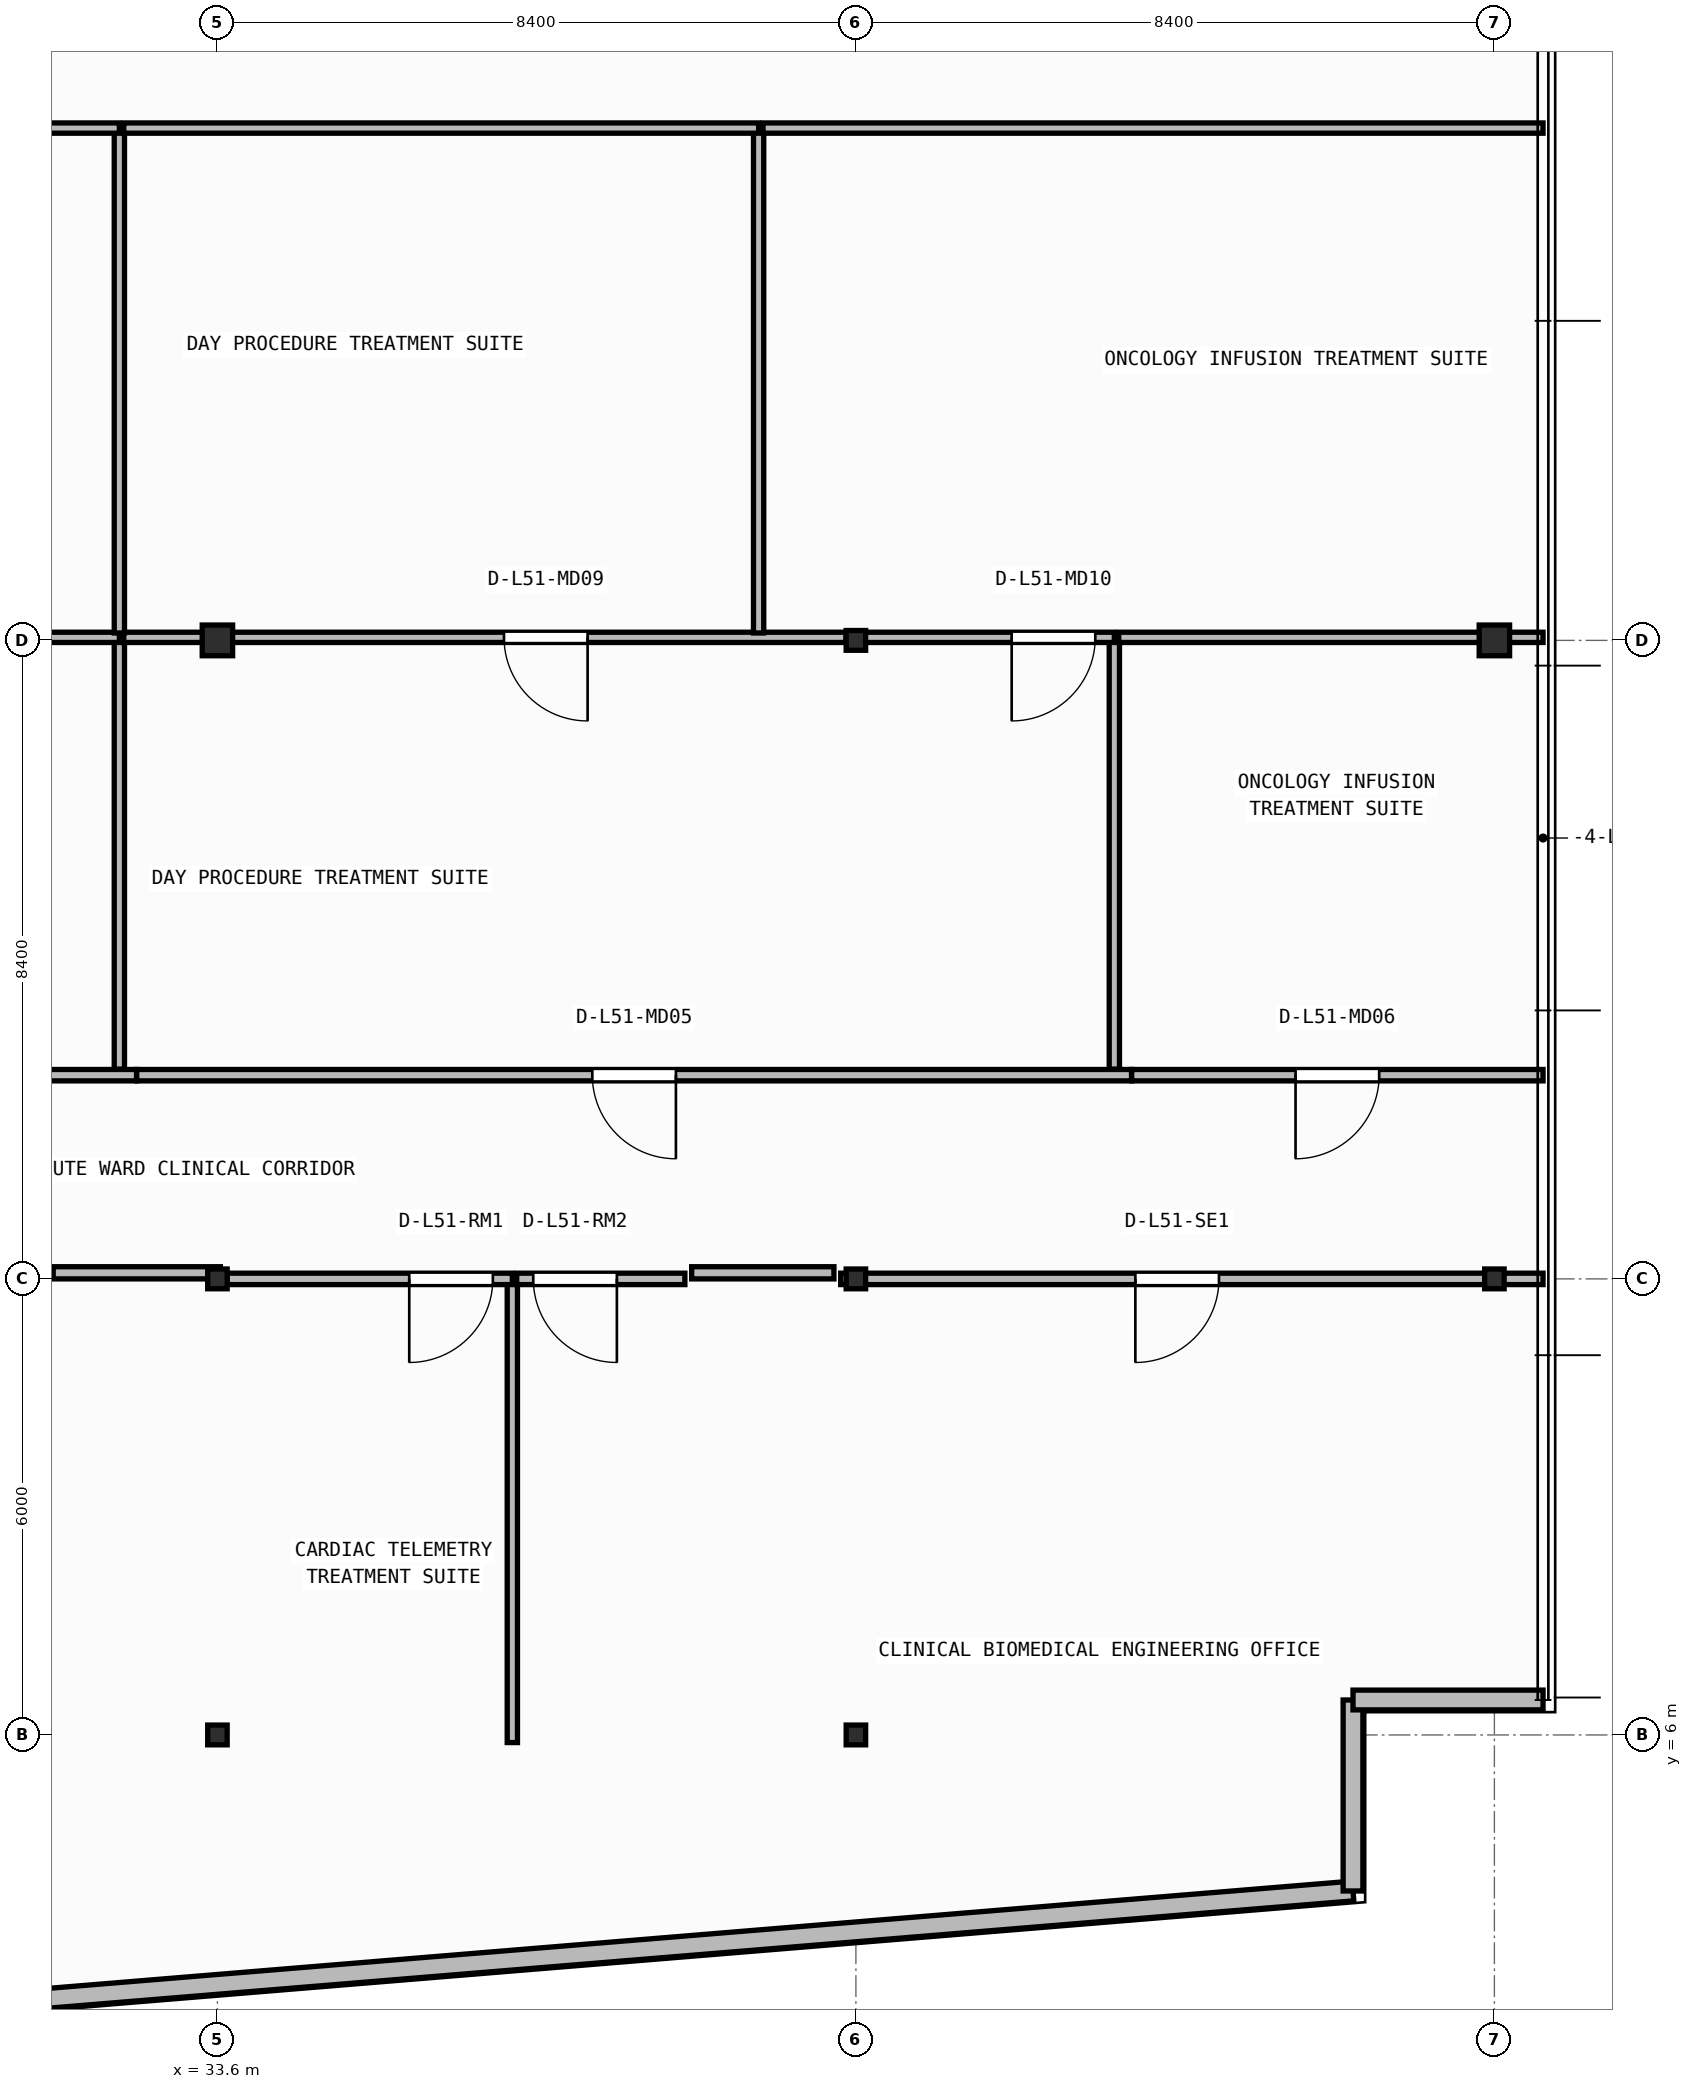
"""IFC4 building model, lengths in metres.
Left out: names, types, materials, properties, quantities, classifications, styles, units other than length and angle.
Written with IfcOpenShell. Run it as: python <this file> out.ifc"""

import sys

from ifc_helpers import new_model, si_unit, direction, frame, frame_2d, origin, origin_2d, place, context, subcontext, project, spatial, rectangle, i_section, extrude, element, fill, save


model = new_model("IFC4")
c1 = context("Model", 3, precision=1e-05, world=origin(), true_north=direction((0.0, 1.0)))
c2 = subcontext(c1, "Body", "Model", "MODEL_VIEW")
j1 = project(units=[si_unit("LENGTHUNIT", "METRE"), si_unit("PLANEANGLEUNIT", "RADIAN")], contexts=[c1])
p1 = place(None, origin())
s1 = spatial("IfcSite", under=j1, at=p1, CompositionType="ELEMENT")
p2 = place(p1, origin())
s2 = spatial("IfcBuilding", under=s1, at=p2, CompositionType="ELEMENT")
p3 = place(p2, frame((0.0, 0.0, 207.9)))
s3 = spatial("IfcBuildingStorey", under=s2, at=p3, CompositionType="ELEMENT", Elevation=207.9)
for number, where, z_axis, x_axis in (
    (1, (33.6, 6.0, 0.0), (0.0, 0.0, 1.0), (1.0, 0.0, 0.0)),
    (2, (42.0, 6.0, 0.0), (0.0, 0.0, 1.0), (1.0, 0.0, 0.0)),
    (3, (33.6, 12.0, 0.0), (0.0, 0.0, 1.0), (1.0, 0.0, 0.0)),
    (4, (42.0, 12.0, 0.0), (0.0, 0.0, 1.0), (1.0, 0.0, 0.0)),
    (5, (50.4, 12.0, 0.0), (0.0, 0.0, 1.0), (1.0, 0.0, 0.0)),
):
    element("IfcColumn", number, at=place(p3, frame(where, z_axis=z_axis, x_axis=x_axis)), inside=s3, PredefinedType="COLUMN", context=c2, shape_type="SweptSolid", body=[
        extrude(i_section(OverallWidth=0.256, OverallDepth=0.26, WebThickness=0.01, FlangeThickness=0.017, FilletRadius=0.013, at=origin_2d()), origin(), (0.0, 0.0, 1.0), 3.95),
    ])
p4 = place(p3, frame((33.6, 20.4, 0.0), z_axis=(0.0, 0.0, 1.0), x_axis=(1.0, 0.0, 0.0)))
e6 = element("IfcColumn", 6, at=p4, inside=s3, PredefinedType="COLUMN", context=c2, shape_type="SweptSolid", body=[
    extrude(i_section(OverallWidth=0.4, OverallDepth=0.404, WebThickness=0.02, FlangeThickness=0.032, at=origin_2d()), origin(), (0.0, 0.0, 1.0), 3.95),
])
p5 = place(p3, frame((42.0, 20.4, 0.0), z_axis=(0.0, 0.0, 1.0), x_axis=(1.0, 0.0, 0.0)))
e7 = element("IfcColumn", 7, at=p5, inside=s3, PredefinedType="COLUMN", context=c2, shape_type="SweptSolid", body=[
    extrude(i_section(OverallWidth=0.256, OverallDepth=0.26, WebThickness=0.01, FlangeThickness=0.017, FilletRadius=0.013, at=origin_2d()), origin(), (0.0, 0.0, 1.0), 3.95),
])
p6 = place(p3, frame((50.4, 20.4, 0.0), z_axis=(0.0, 0.0, 1.0), x_axis=(1.0, 0.0, 0.0)))
e8 = element("IfcColumn", 8, at=p6, inside=s3, PredefinedType="COLUMN", context=c2, shape_type="SweptSolid", body=[
    extrude(i_section(OverallWidth=0.4, OverallDepth=0.404, WebThickness=0.02, FlangeThickness=0.032, at=origin_2d()), origin(), (0.0, 0.0, 1.0), 3.95),
])
p7 = place(p3, frame((2.66, 0.174, 0.0), z_axis=(0.0, 0.0, 1.0), x_axis=(0.996634028439, 0.081979347142, 0.0)))
e9 = element("IfcWall", 9, at=p7, inside=s3, PredefinedType="STANDARD", context=c2, shape_type="SweptSolid", body=[
    extrude(rectangle(XDim=46.035, YDim=0.26, at=frame_2d((23.018, 0.0))), origin(), (0.0, 0.0, 1.0), 3.71),
])
p8 = place(p7, frame((21.817, 0.0, 0.9)))
e10 = element("IfcOpeningElement", 10, at=p8, cuts=e9, PredefinedType="OPENING", context=c2, shape_type="SweptSolid", body=[
    extrude(rectangle(XDim=2.4, YDim=1.65, at=frame_2d((1.2, 0.825))), frame((0.0, 0.14, 0.0), z_axis=(0.0, -1.0, 0.0), x_axis=(1.0, 0.0, 0.0)), (0.0, 0.0, 1.0), 0.28),
])
p9 = place(p3, frame((48.54, 3.948, 0.0), z_axis=(0.0, 0.0, 1.0), x_axis=(0.0, 1.0, 0.0)))
e11 = element("IfcWall", 11, at=p9, inside=s3, PredefinedType="STANDARD", context=c2, shape_type="SweptSolid", body=[
    extrude(rectangle(XDim=2.512, YDim=0.26, at=frame_2d((1.256, 0.0))), origin(), (0.0, 0.0, 1.0), 3.71),
])
p10 = place(p3, frame((48.54, 6.46, 0.0), z_axis=(0.0, 0.0, 1.0), x_axis=(1.0, 0.0, 0.0)))
e12 = element("IfcWall", 12, at=p10, inside=s3, PredefinedType="STANDARD", context=c2, shape_type="SweptSolid", body=[
    extrude(rectangle(XDim=2.5, YDim=0.26, at=frame_2d((1.25, 0.0))), origin(), (0.0, 0.0, 1.0), 3.71),
])
p11 = place(p3, frame((37.48, 5.9, 0.0), z_axis=(0.0, 0.0, 1.0), x_axis=(0.0, 1.0, 0.0)))
e13 = element("IfcWall", 13, at=p11, inside=s3, PredefinedType="PARTITIONING", context=c2, shape_type="SweptSolid", body=[
    extrude(rectangle(XDim=6.1, YDim=0.135, at=frame_2d((3.05, 0.0))), origin(), (0.0, 0.0, 1.0), 3.71),
])
p12 = place(p3, frame((37.48, 12.0, 0.0), z_axis=(0.0, 0.0, 1.0), x_axis=(-1.0, 0.0, 0.0)))
e14 = element("IfcWall", 14, at=p12, inside=s3, PredefinedType="PARTITIONING", context=c2, shape_type="SweptSolid", body=[
    extrude(rectangle(XDim=3.752, YDim=0.15, at=frame_2d((1.876, 0.0))), origin(), (0.0, 0.0, 1.0), 3.152),
])
p13 = place(p12, frame((0.256, 0.0, 0.0)))
e15 = element("IfcOpeningElement", 15, at=p13, cuts=e14, PredefinedType="OPENING", context=c2, shape_type="SweptSolid", body=[
    extrude(rectangle(XDim=1.1, YDim=2.1, at=frame_2d((0.55, 1.05))), frame((0.0, 0.085, 0.0), z_axis=(0.0, -1.0, 0.0), x_axis=(1.0, 0.0, 0.0)), (0.0, 0.0, 1.0), 0.17),
])
p14 = place(p3, frame((39.75, 12.0, 0.0), z_axis=(0.0, 0.0, 1.0), x_axis=(-1.0, 0.0, 0.0)))
e16 = element("IfcWall", 16, at=p14, inside=s3, PredefinedType="PARTITIONING", context=c2, shape_type="SweptSolid", body=[
    extrude(rectangle(XDim=2.212, YDim=0.15, at=frame_2d((1.106, 0.0))), origin(), (0.0, 0.0, 1.0), 3.152),
])
p15 = place(p14, frame((0.895, 0.0, 0.0)))
e17 = element("IfcOpeningElement", 17, at=p15, cuts=e16, PredefinedType="OPENING", context=c2, shape_type="SweptSolid", body=[
    extrude(rectangle(XDim=1.1, YDim=2.1, at=frame_2d((0.55, 1.05))), frame((0.0, 0.085, 0.0), z_axis=(0.0, -1.0, 0.0), x_axis=(1.0, 0.0, 0.0)), (0.0, 0.0, 1.0), 0.17),
])
p16 = place(p3, frame((51.04, 12.0, 0.0), z_axis=(0.0, 0.0, 1.0), x_axis=(-1.0, 0.0, 0.0)))
e18 = element("IfcWall", 18, at=p16, inside=s3, PredefinedType="PARTITIONING", context=c2, shape_type="SweptSolid", body=[
    extrude(rectangle(XDim=9.24, YDim=0.15, at=frame_2d((4.62, 0.0))), origin(), (0.0, 0.0, 1.0), 3.152),
])
p17 = place(p16, frame((4.263, 0.0, 0.0)))
e19 = element("IfcOpeningElement", 19, at=p17, cuts=e18, PredefinedType="OPENING", context=c2, shape_type="SweptSolid", body=[
    extrude(rectangle(XDim=1.1, YDim=2.1, at=frame_2d((0.55, 1.05))), frame((0.0, 0.085, 0.0), z_axis=(0.0, -1.0, 0.0), x_axis=(1.0, 0.0, 0.0)), (0.0, 0.0, 1.0), 0.17),
])
p18 = place(p3, frame((32.536, 14.68, 0.0), z_axis=(0.0, 0.0, 1.0), x_axis=(-1.0, 0.0, 0.0)))
e20 = element("IfcWall", 20, at=p18, inside=s3, PredefinedType="PARTITIONING", context=c2, shape_type="SweptSolid", body=[
    extrude(rectangle(XDim=10.178, YDim=0.15, at=frame_2d((5.089, 0.0))), origin(), (0.0, 0.0, 1.0), 3.71),
])
p19 = place(p18, frame((4.539, 0.0, 0.0)))
e21 = element("IfcOpeningElement", 21, at=p19, cuts=e20, PredefinedType="OPENING", context=c2, shape_type="SweptSolid", body=[
    extrude(rectangle(XDim=1.1, YDim=2.1, at=frame_2d((0.55, 1.05))), frame((0.0, 0.085, 0.0), z_axis=(0.0, -1.0, 0.0), x_axis=(1.0, 0.0, 0.0)), (0.0, 0.0, 1.0), 0.17),
])
p20 = place(p3, frame((45.626, 14.68, 0.0), z_axis=(0.0, 0.0, 1.0), x_axis=(-1.0, 0.0, 0.0)))
e22 = element("IfcWall", 22, at=p20, inside=s3, PredefinedType="PARTITIONING", context=c2, shape_type="SweptSolid", body=[
    extrude(rectangle(XDim=13.088, YDim=0.15, at=frame_2d((6.544, 0.0))), origin(), (0.0, 0.0, 1.0), 3.71),
])
p21 = place(p20, frame((5.994, 0.0, 0.0)))
e23 = element("IfcOpeningElement", 23, at=p21, cuts=e22, PredefinedType="OPENING", context=c2, shape_type="SweptSolid", body=[
    extrude(rectangle(XDim=1.1, YDim=2.1, at=frame_2d((0.55, 1.05))), frame((0.0, 0.085, 0.0), z_axis=(0.0, -1.0, 0.0), x_axis=(1.0, 0.0, 0.0)), (0.0, 0.0, 1.0), 0.17),
])
p22 = place(p3, frame((51.04, 14.68, 0.0), z_axis=(0.0, 0.0, 1.0), x_axis=(-1.0, 0.0, 0.0)))
e24 = element("IfcWall", 24, at=p22, inside=s3, PredefinedType="PARTITIONING", context=c2, shape_type="SweptSolid", body=[
    extrude(rectangle(XDim=5.412, YDim=0.15, at=frame_2d((2.706, 0.0))), origin(), (0.0, 0.0, 1.0), 3.71),
])
p23 = place(p22, frame((2.156, 0.0, 0.0)))
e25 = element("IfcOpeningElement", 25, at=p23, cuts=e24, PredefinedType="OPENING", context=c2, shape_type="SweptSolid", body=[
    extrude(rectangle(XDim=1.1, YDim=2.1, at=frame_2d((0.55, 1.05))), frame((0.0, 0.085, 0.0), z_axis=(0.0, -1.0, 0.0), x_axis=(1.0, 0.0, 0.0)), (0.0, 0.0, 1.0), 0.17),
])
p24 = place(p3, frame((32.31, 14.76, 0.0), z_axis=(0.0, 0.0, 1.0), x_axis=(0.0, 1.0, 0.0)))
e26 = element("IfcWall", 26, at=p24, inside=s3, PredefinedType="PARTITIONING", context=c2, shape_type="SweptSolid", body=[
    extrude(rectangle(XDim=5.68, YDim=0.135, at=frame_2d((2.84, 0.0))), origin(), (0.0, 0.0, 1.0), 3.71),
])
p25 = place(p3, frame((32.31, 20.44, 0.0), z_axis=(0.0, 0.0, 1.0), x_axis=(-1.0, 0.0, 0.0)))
e27 = element("IfcWall", 27, at=p25, inside=s3, PredefinedType="PARTITIONING", context=c2, shape_type="SweptSolid", body=[
    extrude(rectangle(XDim=5.291, YDim=0.135, at=frame_2d((2.645, 0.0))), origin(), (0.0, 0.0, 1.0), 3.152),
])
p26 = place(p25, frame((2.379, 0.0, 0.0)))
e28 = element("IfcOpeningElement", 28, at=p26, cuts=e27, PredefinedType="OPENING", context=c2, shape_type="SweptSolid", body=[
    extrude(rectangle(XDim=1.1, YDim=2.1, at=frame_2d((0.55, 1.05))), frame((0.0, 0.077, 0.0), z_axis=(0.0, -1.0, 0.0), x_axis=(1.0, 0.0, 0.0)), (0.0, 0.0, 1.0), 0.155),
])
p27 = place(p3, frame((45.4, 14.76, 0.0), z_axis=(0.0, 0.0, 1.0), x_axis=(0.0, 1.0, 0.0)))
e29 = element("IfcWall", 29, at=p27, inside=s3, PredefinedType="PARTITIONING", context=c2, shape_type="SweptSolid", body=[
    extrude(rectangle(XDim=5.68, YDim=0.135, at=frame_2d((2.84, 0.0))), origin(), (0.0, 0.0, 1.0), 3.71),
])
p28 = place(p3, frame((41.872, 20.44, 0.0), z_axis=(0.0, 0.0, 1.0), x_axis=(-1.0, 0.0, 0.0)))
e30 = element("IfcWall", 30, at=p28, inside=s3, PredefinedType="PARTITIONING", context=c2, shape_type="SweptSolid", body=[
    extrude(rectangle(XDim=9.505, YDim=0.135, at=frame_2d((4.752, 0.0))), origin(), (0.0, 0.0, 1.0), 3.152),
])
p29 = place(p28, frame((3.402, 0.0, 0.0)))
e31 = element("IfcOpeningElement", 31, at=p29, cuts=e30, PredefinedType="OPENING", context=c2, shape_type="SweptSolid", body=[
    extrude(rectangle(XDim=1.1, YDim=2.1, at=frame_2d((0.55, 1.05))), frame((0.0, 0.077, 0.0), z_axis=(0.0, -1.0, 0.0), x_axis=(1.0, 0.0, 0.0)), (0.0, 0.0, 1.0), 0.155),
])
p30 = place(p3, frame((45.4, 20.44, 0.0), z_axis=(0.0, 0.0, 1.0), x_axis=(-1.0, 0.0, 0.0)))
e32 = element("IfcWall", 32, at=p30, inside=s3, PredefinedType="PARTITIONING", context=c2, shape_type="SweptSolid", body=[
    extrude(rectangle(XDim=3.526, YDim=0.135, at=frame_2d((1.763, 0.0))), origin(), (0.0, 0.0, 1.0), 3.152),
])
p31 = place(p30, frame((0.25, 0.0, 0.0)))
e33 = element("IfcOpeningElement", 33, at=p31, cuts=e32, PredefinedType="OPENING", context=c2, shape_type="SweptSolid", body=[
    extrude(rectangle(XDim=1.1, YDim=2.1, at=frame_2d((0.55, 1.05))), frame((0.0, 0.077, 0.0), z_axis=(0.0, -1.0, 0.0), x_axis=(1.0, 0.0, 0.0)), (0.0, 0.0, 1.0), 0.155),
])
p32 = place(p3, frame((51.04, 20.44, 0.0), z_axis=(0.0, 0.0, 1.0), x_axis=(-1.0, 0.0, 0.0)))
e34 = element("IfcWall", 34, at=p32, inside=s3, PredefinedType="PARTITIONING", context=c2, shape_type="SweptSolid", body=[
    extrude(rectangle(XDim=5.583, YDim=0.135, at=frame_2d((2.791, 0.0))), origin(), (0.0, 0.0, 1.0), 3.152),
])
p33 = place(p3, frame((32.31, 20.498, 0.0), z_axis=(0.0, 0.0, 1.0), x_axis=(0.0, 1.0, 0.0)))
e35 = element("IfcWall", 35, at=p33, inside=s3, PredefinedType="PARTITIONING", context=c2, shape_type="SweptSolid", body=[
    extrude(rectangle(XDim=6.642, YDim=0.135, at=frame_2d((3.321, 0.0))), origin(), (0.0, 0.0, 1.0), 3.71),
])
p34 = place(p3, frame((32.31, 27.14, 0.0), z_axis=(0.0, 0.0, 1.0), x_axis=(-1.0, 0.0, 0.0)))
e36 = element("IfcWall", 36, at=p34, inside=s3, PredefinedType="PARTITIONING", context=c2, shape_type="SweptSolid", body=[
    extrude(rectangle(XDim=3.321, YDim=0.135, at=frame_2d((1.66, 0.0))), origin(), (0.0, 0.0, 1.0), 3.71),
])
p35 = place(p34, frame((1.975, 0.0, 0.0)))
e37 = element("IfcOpeningElement", 37, at=p35, cuts=e36, PredefinedType="OPENING", context=c2, shape_type="SweptSolid", body=[
    extrude(rectangle(XDim=1.1, YDim=2.1, at=frame_2d((0.55, 1.05))), frame((0.0, 0.077, 0.0), z_axis=(0.0, -1.0, 0.0), x_axis=(1.0, 0.0, 0.0)), (0.0, 0.0, 1.0), 0.155),
])
p36 = place(p3, frame((40.72, 20.498, 0.0), z_axis=(0.0, 0.0, 1.0), x_axis=(0.0, 1.0, 0.0)))
e38 = element("IfcWall", 38, at=p36, inside=s3, PredefinedType="PARTITIONING", context=c2, shape_type="SweptSolid", body=[
    extrude(rectangle(XDim=6.642, YDim=0.135, at=frame_2d((3.321, 0.0))), origin(), (0.0, 0.0, 1.0), 3.71),
])
p37 = place(p3, frame((40.72, 27.14, 0.0), z_axis=(0.0, 0.0, 1.0), x_axis=(-1.0, 0.0, 0.0)))
e39 = element("IfcWall", 39, at=p37, inside=s3, PredefinedType="PARTITIONING", context=c2, shape_type="SweptSolid", body=[
    extrude(rectangle(XDim=8.353, YDim=0.135, at=frame_2d((4.176, 0.0))), origin(), (0.0, 0.0, 1.0), 3.71),
])
p38 = place(p3, frame((51.04, 27.14, 0.0), z_axis=(0.0, 0.0, 1.0), x_axis=(-1.0, 0.0, 0.0)))
e40 = element("IfcWall", 40, at=p38, inside=s3, PredefinedType="PARTITIONING", context=c2, shape_type="SweptSolid", body=[
    extrude(rectangle(XDim=10.262, YDim=0.135, at=frame_2d((5.131, 0.0))), origin(), (0.0, 0.0, 1.0), 3.71),
])
p39 = place(p3, frame((31.439, 12.08, 0.0), z_axis=(0.0, 0.0, 1.0), x_axis=(1.0, 0.0, 0.0)))
e41 = element("IfcWall", 41, at=p39, inside=s3, PredefinedType="PARTITIONING", context=c2, shape_type="SweptSolid", body=[
    extrude(rectangle(XDim=2.199, YDim=0.16, at=frame_2d((1.1, 0.0))), origin(), (0.0, 0.0, 1.0), 3.152),
])
p40 = place(p3, frame((39.839, 12.08, 0.0), z_axis=(0.0, 0.0, 1.0), x_axis=(1.0, 0.0, 0.0)))
e42 = element("IfcWall", 42, at=p40, inside=s3, PredefinedType="PARTITIONING", context=c2, shape_type="SweptSolid", body=[
    extrude(rectangle(XDim=1.871, YDim=0.16, at=frame_2d((0.936, 0.0))), origin(), (0.0, 0.0, 1.0), 3.152),
])
p41 = place(p13, origin())
e43 = element("IfcDoor", 43, at=p41, inside=s3, OperationType="SINGLE_SWING_RIGHT", PredefinedType="DOOR", context=c2, shape_type="SweptSolid", body=[
    extrude(rectangle(XDim=1.1, YDim=2.1, at=frame_2d((0.55, 1.05))), frame((0.0, 0.025, 0.0), z_axis=(0.0, -1.0, 0.0), x_axis=(1.0, 0.0, 0.0)), (0.0, 0.0, 1.0), 0.05),
])
fill(e15, e43)
p42 = place(p15, origin())
e44 = element("IfcDoor", 44, at=p42, inside=s3, OperationType="SINGLE_SWING_LEFT", PredefinedType="DOOR", context=c2, shape_type="SweptSolid", body=[
    extrude(rectangle(XDim=1.1, YDim=2.1, at=frame_2d((0.55, 1.05))), frame((0.0, 0.025, 0.0), z_axis=(0.0, -1.0, 0.0), x_axis=(1.0, 0.0, 0.0)), (0.0, 0.0, 1.0), 0.05),
])
fill(e17, e44)
p43 = place(p17, origin())
e45 = element("IfcDoor", 45, at=p43, inside=s3, OperationType="SINGLE_SWING_RIGHT", PredefinedType="DOOR", context=c2, shape_type="SweptSolid", body=[
    extrude(rectangle(XDim=1.1, YDim=2.1, at=frame_2d((0.55, 1.05))), frame((0.0, 0.025, 0.0), z_axis=(0.0, -1.0, 0.0), x_axis=(1.0, 0.0, 0.0)), (0.0, 0.0, 1.0), 0.05),
])
fill(e19, e45)
p44 = place(p21, origin())
e46 = element("IfcDoor", 46, at=p44, inside=s3, OperationType="SINGLE_SWING_LEFT", PredefinedType="DOOR", context=c2, shape_type="SweptSolid", body=[
    extrude(rectangle(XDim=1.1, YDim=2.1, at=frame_2d((0.55, 1.05))), frame((0.0, 0.025, 0.0), z_axis=(0.0, -1.0, 0.0), x_axis=(1.0, 0.0, 0.0)), (0.0, 0.0, 1.0), 0.05),
])
fill(e23, e46)
p45 = place(p23, origin())
e47 = element("IfcDoor", 47, at=p45, inside=s3, OperationType="SINGLE_SWING_RIGHT", PredefinedType="DOOR", context=c2, shape_type="SweptSolid", body=[
    extrude(rectangle(XDim=1.1, YDim=2.1, at=frame_2d((0.55, 1.05))), frame((0.0, 0.025, 0.0), z_axis=(0.0, -1.0, 0.0), x_axis=(1.0, 0.0, 0.0)), (0.0, 0.0, 1.0), 0.05),
])
fill(e25, e47)
p46 = place(p29, origin())
e48 = element("IfcDoor", 48, at=p46, inside=s3, OperationType="SINGLE_SWING_LEFT", PredefinedType="DOOR", context=c2, shape_type="SweptSolid", body=[
    extrude(rectangle(XDim=1.1, YDim=2.1, at=frame_2d((0.55, 1.05))), frame((0.0, 0.025, 0.0), z_axis=(0.0, -1.0, 0.0), x_axis=(1.0, 0.0, 0.0)), (0.0, 0.0, 1.0), 0.05),
])
fill(e31, e48)
p47 = place(p31, origin())
e49 = element("IfcDoor", 49, at=p47, inside=s3, OperationType="SINGLE_SWING_RIGHT", PredefinedType="DOOR", context=c2, shape_type="SweptSolid", body=[
    extrude(rectangle(XDim=1.1, YDim=2.1, at=frame_2d((0.55, 1.05))), frame((0.0, 0.025, 0.0), z_axis=(0.0, -1.0, 0.0), x_axis=(1.0, 0.0, 0.0)), (0.0, 0.0, 1.0), 0.05),
])
fill(e33, e49)
save(model, sys.argv[1])
